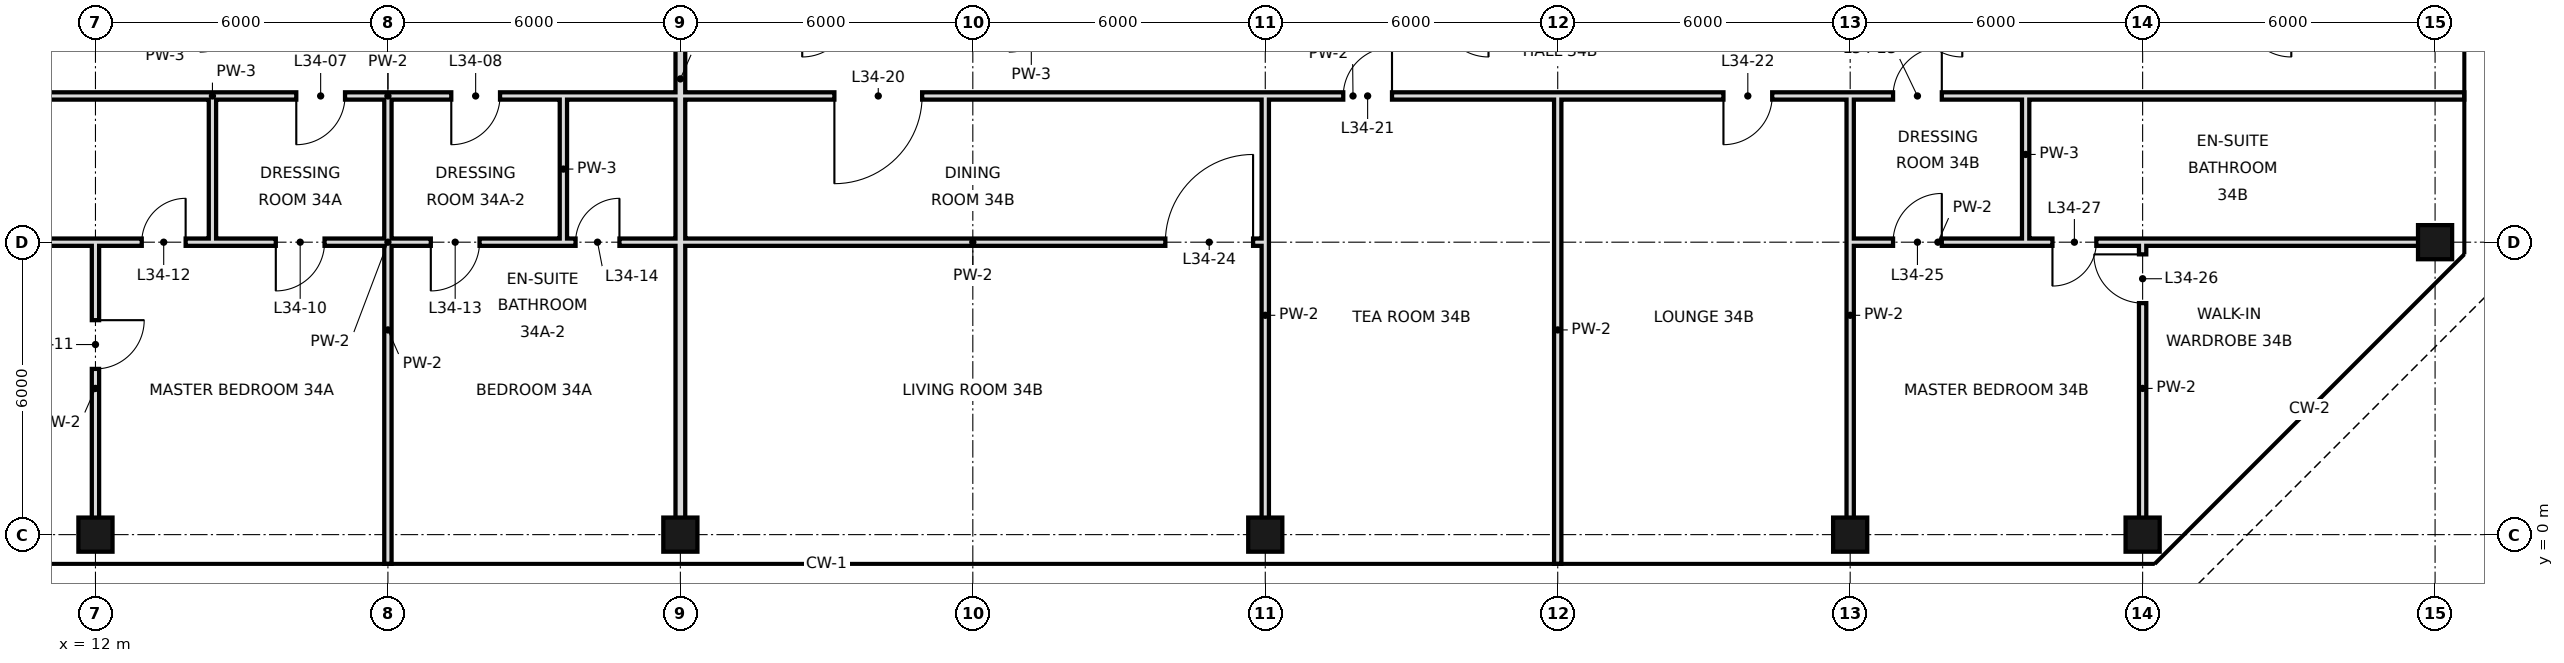
"""IFC4 building model, lengths in metres.
Left out: names, types, materials, properties, quantities, classifications, styles, units other than length and angle.
Written with IfcOpenShell. Run it as: python <this file> out.ifc"""

import sys

from ifc_helpers import new_model, si_unit, direction, frame, frame_2d, origin, origin_2d, place, context, subcontext, project, spatial, rectangle, hollow_rectangle, extrude, element, fill, save


model = new_model("IFC4")
c1 = context("Model", 3, precision=1e-05, world=origin(), true_north=direction((0.0, 1.0)))
c2 = subcontext(c1, "Body", "Model", "MODEL_VIEW")
j1 = project(units=[si_unit("LENGTHUNIT", "METRE"), si_unit("PLANEANGLEUNIT", "RADIAN")], contexts=[c1])
p1 = place(None, origin())
s1 = spatial("IfcSite", under=j1, at=p1, CompositionType="ELEMENT")
p2 = place(p1, origin())
s2 = spatial("IfcBuilding", under=s1, at=p2, CompositionType="ELEMENT")
p3 = place(p2, frame((0.0, 0.0, 151.0)))
s3 = spatial("IfcBuildingStorey", under=s2, at=p3, CompositionType="ELEMENT", Elevation=151.0)
for number, where, z_axis, x_axis in (
    (1, (12.0, 0.0, 0.0), (0.0, 0.0, 1.0), (1.0, 0.0, 0.0)),
    (2, (24.0, 0.0, 0.0), (0.0, 0.0, 1.0), (1.0, 0.0, 0.0)),
    (3, (36.0, 0.0, 0.0), (0.0, 0.0, 1.0), (1.0, 0.0, 0.0)),
    (4, (48.0, 0.0, 0.0), (0.0, 0.0, 1.0), (1.0, 0.0, 0.0)),
    (5, (54.0, 0.0, 0.0), (0.0, 0.0, 1.0), (1.0, 0.0, 0.0)),
    (6, (60.0, 6.0, 0.0), (0.0, 0.0, 1.0), (1.0, 0.0, 0.0)),
):
    element("IfcColumn", number, at=place(p3, frame(where, z_axis=z_axis, x_axis=x_axis)), inside=s3, PredefinedType="COLUMN", context=c2, shape_type="SweptSolid", body=[
        extrude(hollow_rectangle(XDim=0.7, YDim=0.7, WallThickness=0.036, at=origin_2d()), origin(), (0.0, 0.0, 1.0), 3.6),
    ])
p4 = place(p3, frame((12.0, 0.0, 0.0), z_axis=(0.0, 0.0, 1.0), x_axis=(0.0, 1.0, 0.0)))
e7 = element("IfcWall", 7, at=p4, inside=s3, PredefinedType="PARTITIONING", context=c2, shape_type="SweptSolid", body=[
    extrude(rectangle(XDim=6.0, YDim=0.15, at=frame_2d((3.0, 0.0))), origin(), (0.0, 0.0, 1.0), 2.72),
])
p5 = place(p4, frame((3.4, 0.0, 0.0)))
e8 = element("IfcOpeningElement", 8, at=p5, cuts=e7, PredefinedType="OPENING", context=c2, shape_type="SweptSolid", body=[
    extrude(rectangle(XDim=1.0, YDim=2.4, at=frame_2d((0.5, 1.2))), frame((0.0, 0.085, 0.0), z_axis=(0.0, -1.0, 0.0), x_axis=(1.0, 0.0, 0.0)), (0.0, 0.0, 1.0), 0.17),
])
p6 = place(p3, frame((14.4, 6.0, 0.0), z_axis=(0.0, 0.0, 1.0), x_axis=(0.0, 1.0, 0.0)))
e9 = element("IfcWall", 9, at=p6, inside=s3, PredefinedType="PARTITIONING", context=c2, shape_type="SweptSolid", body=[
    extrude(rectangle(XDim=3.0, YDim=0.15, at=frame_2d((1.5, 0.0))), origin(), (0.0, 0.0, 1.0), 3.42),
])
p7 = place(p3, frame((18.0, -0.6, 0.0), z_axis=(0.0, 0.0, 1.0), x_axis=(0.0, 1.0, 0.0)))
e10 = element("IfcWall", 10, at=p7, inside=s3, PredefinedType="PARTITIONING", context=c2, shape_type="SweptSolid", body=[
    extrude(rectangle(XDim=9.6, YDim=0.15, at=frame_2d((4.8, 0.0))), origin(), (0.0, 0.0, 1.0), 2.72),
])
p8 = place(p3, frame((21.6, 6.0, 0.0), z_axis=(0.0, 0.0, 1.0), x_axis=(0.0, 1.0, 0.0)))
e11 = element("IfcWall", 11, at=p8, inside=s3, PredefinedType="PARTITIONING", context=c2, shape_type="SweptSolid", body=[
    extrude(rectangle(XDim=3.0, YDim=0.15, at=frame_2d((1.5, 0.0))), origin(), (0.0, 0.0, 1.0), 3.42),
])
p9 = place(p3, frame((24.0, 0.0, 0.0), z_axis=(0.0, 0.0, 1.0), x_axis=(0.0, 1.0, 0.0)))
e12 = element("IfcWall", 12, at=p9, inside=s3, PredefinedType="SOLIDWALL", context=c2, shape_type="SweptSolid", body=[
    extrude(rectangle(XDim=18.7, YDim=0.2, at=frame_2d((9.35, 0.0))), origin(), (0.0, 0.0, 1.0), 2.72),
])
p10 = place(p3, frame((36.0, 0.0, 0.0), z_axis=(0.0, 0.0, 1.0), x_axis=(0.0, 1.0, 0.0)))
e13 = element("IfcWall", 13, at=p10, inside=s3, PredefinedType="PARTITIONING", context=c2, shape_type="SweptSolid", body=[
    extrude(rectangle(XDim=9.0, YDim=0.15, at=frame_2d((4.5, 0.0))), origin(), (0.0, 0.0, 1.0), 2.72),
])
p11 = place(p3, frame((42.0, -0.6, 0.0), z_axis=(0.0, 0.0, 1.0), x_axis=(0.0, 1.0, 0.0)))
e14 = element("IfcWall", 14, at=p11, inside=s3, PredefinedType="PARTITIONING", context=c2, shape_type="SweptSolid", body=[
    extrude(rectangle(XDim=9.6, YDim=0.15, at=frame_2d((4.8, 0.0))), origin(), (0.0, 0.0, 1.0), 2.72),
])
p12 = place(p3, frame((48.0, 0.0, 0.0), z_axis=(0.0, 0.0, 1.0), x_axis=(0.0, 1.0, 0.0)))
e15 = element("IfcWall", 15, at=p12, inside=s3, PredefinedType="PARTITIONING", context=c2, shape_type="SweptSolid", body=[
    extrude(rectangle(XDim=9.0, YDim=0.15, at=frame_2d((4.5, 0.0))), origin(), (0.0, 0.0, 1.0), 2.72),
])
p13 = place(p3, frame((51.6, 6.0, 0.0), z_axis=(0.0, 0.0, 1.0), x_axis=(0.0, 1.0, 0.0)))
e16 = element("IfcWall", 16, at=p13, inside=s3, PredefinedType="PARTITIONING", context=c2, shape_type="SweptSolid", body=[
    extrude(rectangle(XDim=3.0, YDim=0.15, at=frame_2d((1.5, 0.0))), origin(), (0.0, 0.0, 1.0), 3.42),
])
p14 = place(p3, frame((54.0, 0.0, 0.0), z_axis=(0.0, 0.0, 1.0), x_axis=(0.0, 1.0, 0.0)))
e17 = element("IfcWall", 17, at=p14, inside=s3, PredefinedType="PARTITIONING", context=c2, shape_type="SweptSolid", body=[
    extrude(rectangle(XDim=6.0, YDim=0.15, at=frame_2d((3.0, 0.0))), origin(), (0.0, 0.0, 1.0), 3.42),
])
p15 = place(p14, frame((4.75, 0.0, 0.0)))
e18 = element("IfcOpeningElement", 18, at=p15, cuts=e17, PredefinedType="OPENING", context=c2, shape_type="SweptSolid", body=[
    extrude(rectangle(XDim=1.0, YDim=2.4, at=frame_2d((0.5, 1.2))), frame((0.0, 0.085, 0.0), z_axis=(0.0, -1.0, 0.0), x_axis=(1.0, 0.0, 0.0)), (0.0, 0.0, 1.0), 0.17),
])
p16 = place(p3, frame((14.4, 6.0, 0.0), z_axis=(0.0, 0.0, 1.0), x_axis=(1.0, 0.0, 0.0)))
e19 = element("IfcWall", 19, at=p16, inside=s3, PredefinedType="PARTITIONING", context=c2, shape_type="SweptSolid", body=[
    extrude(rectangle(XDim=7.2, YDim=0.15, at=frame_2d((3.6, 0.0))), origin(), (0.0, 0.0, 1.0), 2.97),
])
p17 = place(p16, frame((1.3, 0.0, 0.0)))
e20 = element("IfcOpeningElement", 20, at=p17, cuts=e19, PredefinedType="OPENING", context=c2, shape_type="SweptSolid", body=[
    extrude(rectangle(XDim=1.0, YDim=2.4, at=frame_2d((0.5, 1.2))), frame((0.0, 0.085, 0.0), z_axis=(0.0, -1.0, 0.0), x_axis=(1.0, 0.0, 0.0)), (0.0, 0.0, 1.0), 0.17),
])
p18 = place(p16, frame((4.48, 0.0, 0.0)))
e21 = element("IfcOpeningElement", 21, at=p18, cuts=e19, PredefinedType="OPENING", context=c2, shape_type="SweptSolid", body=[
    extrude(rectangle(XDim=1.0, YDim=2.4, at=frame_2d((0.5, 1.2))), frame((0.0, 0.085, 0.0), z_axis=(0.0, -1.0, 0.0), x_axis=(1.0, 0.0, 0.0)), (0.0, 0.0, 1.0), 0.17),
])
p19 = place(p3, frame((24.0, 6.0, 0.0), z_axis=(0.0, 0.0, 1.0), x_axis=(1.0, 0.0, 0.0)))
e22 = element("IfcWall", 22, at=p19, inside=s3, PredefinedType="PARTITIONING", context=c2, shape_type="SweptSolid", body=[
    extrude(rectangle(XDim=12.0, YDim=0.15, at=frame_2d((6.0, 0.0))), origin(), (0.0, 0.0, 1.0), 2.97),
])
p20 = place(p19, frame((9.95, 0.0, 0.0)))
e23 = element("IfcOpeningElement", 23, at=p20, cuts=e22, PredefinedType="OPENING", context=c2, shape_type="SweptSolid", body=[
    extrude(rectangle(XDim=1.8, YDim=2.4, at=frame_2d((0.9, 1.2))), frame((0.0, 0.085, 0.0), z_axis=(0.0, -1.0, 0.0), x_axis=(1.0, 0.0, 0.0)), (0.0, 0.0, 1.0), 0.17),
])
p21 = place(p3, frame((48.0, 6.0, 0.0), z_axis=(0.0, 0.0, 1.0), x_axis=(1.0, 0.0, 0.0)))
e24 = element("IfcWall", 24, at=p21, inside=s3, PredefinedType="PARTITIONING", context=c2, shape_type="SweptSolid", body=[
    extrude(rectangle(XDim=3.6, YDim=0.15, at=frame_2d((1.8, 0.0))), origin(), (0.0, 0.0, 1.0), 2.72),
])
p22 = place(p21, frame((0.88, 0.0, 0.0)))
e25 = element("IfcOpeningElement", 25, at=p22, cuts=e24, PredefinedType="OPENING", context=c2, shape_type="SweptSolid", body=[
    extrude(rectangle(XDim=1.0, YDim=2.4, at=frame_2d((0.5, 1.2))), frame((0.0, 0.085, 0.0), z_axis=(0.0, -1.0, 0.0), x_axis=(1.0, 0.0, 0.0)), (0.0, 0.0, 1.0), 0.17),
])
p23 = place(p3, frame((6.0, 6.0, 0.0), z_axis=(0.0, 0.0, 1.0), x_axis=(1.0, 0.0, 0.0)))
e26 = element("IfcWall", 26, at=p23, inside=s3, PredefinedType="PARTITIONING", context=c2, shape_type="SweptSolid", body=[
    extrude(rectangle(XDim=8.4, YDim=0.15, at=frame_2d((4.2, 0.0))), origin(), (0.0, 0.0, 1.0), 2.97),
])
p24 = place(p23, frame((6.95, 0.0, 0.0)))
e27 = element("IfcOpeningElement", 27, at=p24, cuts=e26, PredefinedType="OPENING", context=c2, shape_type="SweptSolid", body=[
    extrude(rectangle(XDim=0.9, YDim=2.4, at=frame_2d((0.45, 1.2))), frame((0.0, 0.085, 0.0), z_axis=(0.0, -1.0, 0.0), x_axis=(1.0, 0.0, 0.0)), (0.0, 0.0, 1.0), 0.17),
])
p25 = place(p3, frame((21.6, 6.0, 0.0), z_axis=(0.0, 0.0, 1.0), x_axis=(1.0, 0.0, 0.0)))
e28 = element("IfcWall", 28, at=p25, inside=s3, PredefinedType="PARTITIONING", context=c2, shape_type="SweptSolid", body=[
    extrude(rectangle(XDim=2.4, YDim=0.15, at=frame_2d((1.2, 0.0))), origin(), (0.0, 0.0, 1.0), 2.97),
])
p26 = place(p25, frame((0.25, 0.0, 0.0)))
e29 = element("IfcOpeningElement", 29, at=p26, cuts=e28, PredefinedType="OPENING", context=c2, shape_type="SweptSolid", body=[
    extrude(rectangle(XDim=0.9, YDim=2.4, at=frame_2d((0.45, 1.2))), frame((0.0, 0.085, 0.0), z_axis=(0.0, -1.0, 0.0), x_axis=(1.0, 0.0, 0.0)), (0.0, 0.0, 1.0), 0.17),
])
p27 = place(p3, frame((51.6, 6.0, 0.0), z_axis=(0.0, 0.0, 1.0), x_axis=(1.0, 0.0, 0.0)))
e30 = element("IfcWall", 30, at=p27, inside=s3, PredefinedType="PARTITIONING", context=c2, shape_type="SweptSolid", body=[
    extrude(rectangle(XDim=8.4, YDim=0.15, at=frame_2d((4.2, 0.0))), origin(), (0.0, 0.0, 1.0), 2.72),
])
p28 = place(p27, frame((0.55, 0.0, 0.0)))
e31 = element("IfcOpeningElement", 31, at=p28, cuts=e30, PredefinedType="OPENING", context=c2, shape_type="SweptSolid", body=[
    extrude(rectangle(XDim=0.9, YDim=2.4, at=frame_2d((0.45, 1.2))), frame((0.0, 0.085, 0.0), z_axis=(0.0, -1.0, 0.0), x_axis=(1.0, 0.0, 0.0)), (0.0, 0.0, 1.0), 0.17),
])
p29 = place(p3, frame((14.4, 9.0, 0.0), z_axis=(0.0, 0.0, 1.0), x_axis=(1.0, 0.0, 0.0)))
e32 = element("IfcWall", 32, at=p29, inside=s3, PredefinedType="PARTITIONING", context=c2, shape_type="SweptSolid", body=[
    extrude(rectangle(XDim=7.2, YDim=0.15, at=frame_2d((3.6, 0.0))), origin(), (0.0, 0.0, 1.0), 3.42),
])
p30 = place(p29, frame((1.72, 0.0, 0.0)))
e33 = element("IfcOpeningElement", 33, at=p30, cuts=e32, PredefinedType="OPENING", context=c2, shape_type="SweptSolid", body=[
    extrude(rectangle(XDim=1.0, YDim=2.4, at=frame_2d((0.5, 1.2))), frame((0.0, 0.085, 0.0), z_axis=(0.0, -1.0, 0.0), x_axis=(1.0, 0.0, 0.0)), (0.0, 0.0, 1.0), 0.17),
])
p31 = place(p29, frame((4.9, 0.0, 0.0)))
e34 = element("IfcOpeningElement", 34, at=p31, cuts=e32, PredefinedType="OPENING", context=c2, shape_type="SweptSolid", body=[
    extrude(rectangle(XDim=1.0, YDim=2.4, at=frame_2d((0.5, 1.2))), frame((0.0, 0.085, 0.0), z_axis=(0.0, -1.0, 0.0), x_axis=(1.0, 0.0, 0.0)), (0.0, 0.0, 1.0), 0.17),
])
p32 = place(p3, frame((24.0, 9.0, 0.0), z_axis=(0.0, 0.0, 1.0), x_axis=(1.0, 0.0, 0.0)))
e35 = element("IfcWall", 35, at=p32, inside=s3, PredefinedType="PARTITIONING", context=c2, shape_type="SweptSolid", body=[
    extrude(rectangle(XDim=27.6, YDim=0.15, at=frame_2d((13.8, 0.0))), origin(), (0.0, 0.0, 1.0), 3.42),
])
p33 = place(p32, frame((3.16, 0.0, 0.0)))
e36 = element("IfcOpeningElement", 36, at=p33, cuts=e35, PredefinedType="OPENING", context=c2, shape_type="SweptSolid", body=[
    extrude(rectangle(XDim=1.8, YDim=2.4, at=frame_2d((0.9, 1.2))), frame((0.0, 0.085, 0.0), z_axis=(0.0, -1.0, 0.0), x_axis=(1.0, 0.0, 0.0)), (0.0, 0.0, 1.0), 0.17),
])
p34 = place(p32, frame((13.6, 0.0, 0.0)))
e37 = element("IfcOpeningElement", 37, at=p34, cuts=e35, PredefinedType="OPENING", context=c2, shape_type="SweptSolid", body=[
    extrude(rectangle(XDim=1.0, YDim=2.4, at=frame_2d((0.5, 1.2))), frame((0.0, 0.085, 0.0), z_axis=(0.0, -1.0, 0.0), x_axis=(1.0, 0.0, 0.0)), (0.0, 0.0, 1.0), 0.17),
])
p35 = place(p32, frame((21.4, 0.0, 0.0)))
e38 = element("IfcOpeningElement", 38, at=p35, cuts=e35, PredefinedType="OPENING", context=c2, shape_type="SweptSolid", body=[
    extrude(rectangle(XDim=1.0, YDim=2.4, at=frame_2d((0.5, 1.2))), frame((0.0, 0.085, 0.0), z_axis=(0.0, -1.0, 0.0), x_axis=(1.0, 0.0, 0.0)), (0.0, 0.0, 1.0), 0.17),
])
p36 = place(p32, frame((24.88, 0.0, 0.0)))
e39 = element("IfcOpeningElement", 39, at=p36, cuts=e35, PredefinedType="OPENING", context=c2, shape_type="SweptSolid", body=[
    extrude(rectangle(XDim=1.0, YDim=2.4, at=frame_2d((0.5, 1.2))), frame((0.0, 0.085, 0.0), z_axis=(0.0, -1.0, 0.0), x_axis=(1.0, 0.0, 0.0)), (0.0, 0.0, 1.0), 0.17),
])
p37 = place(p3, frame((6.0, 9.0, 0.0), z_axis=(0.0, 0.0, 1.0), x_axis=(1.0, 0.0, 0.0)))
e40 = element("IfcWall", 40, at=p37, inside=s3, PredefinedType="PARTITIONING", context=c2, shape_type="SweptSolid", body=[
    extrude(rectangle(XDim=8.4, YDim=0.15, at=frame_2d((4.2, 0.0))), origin(), (0.0, 0.0, 1.0), 3.42),
])
p38 = place(p3, frame((21.6, 9.0, 0.0), z_axis=(0.0, 0.0, 1.0), x_axis=(1.0, 0.0, 0.0)))
e41 = element("IfcWall", 41, at=p38, inside=s3, PredefinedType="PARTITIONING", context=c2, shape_type="SweptSolid", body=[
    extrude(rectangle(XDim=2.4, YDim=0.15, at=frame_2d((1.2, 0.0))), origin(), (0.0, 0.0, 1.0), 3.42),
])
p39 = place(p3, frame((51.6, 9.0, 0.0), z_axis=(0.0, 0.0, 1.0), x_axis=(1.0, 0.0, 0.0)))
e42 = element("IfcWall", 42, at=p39, inside=s3, PredefinedType="PARTITIONING", context=c2, shape_type="SweptSolid", body=[
    extrude(rectangle(XDim=9.0, YDim=0.15, at=frame_2d((4.5, 0.0))), origin(), (0.0, 0.0, 1.0), 3.42),
])
p40 = place(p30, frame((1.0, 0.0, 0.0), z_axis=(0.0, 0.0, 1.0), x_axis=(-1.0, 0.0, 0.0)))
e43 = element("IfcDoor", 43, at=p40, inside=s3, OperationType="SINGLE_SWING_RIGHT", PredefinedType="DOOR", context=c2, shape_type="SweptSolid", body=[
    extrude(rectangle(XDim=1.0, YDim=2.4, at=frame_2d((0.5, 1.2))), frame((0.0, 0.025, 0.0), z_axis=(0.0, -1.0, 0.0), x_axis=(1.0, 0.0, 0.0)), (0.0, 0.0, 1.0), 0.05),
])
fill(e33, e43)
p41 = place(p31, frame((1.0, 0.0, 0.0), z_axis=(0.0, 0.0, 1.0), x_axis=(-1.0, 0.0, 0.0)))
e44 = element("IfcDoor", 44, at=p41, inside=s3, OperationType="SINGLE_SWING_RIGHT", PredefinedType="DOOR", context=c2, shape_type="SweptSolid", body=[
    extrude(rectangle(XDim=1.0, YDim=2.4, at=frame_2d((0.5, 1.2))), frame((0.0, 0.025, 0.0), z_axis=(0.0, -1.0, 0.0), x_axis=(1.0, 0.0, 0.0)), (0.0, 0.0, 1.0), 0.05),
])
fill(e34, e44)
p42 = place(p17, frame((1.0, 0.0, 0.0), z_axis=(0.0, 0.0, 1.0), x_axis=(-1.0, 0.0, 0.0)))
e45 = element("IfcDoor", 45, at=p42, inside=s3, OperationType="SINGLE_SWING_RIGHT", PredefinedType="DOOR", context=c2, shape_type="SweptSolid", body=[
    extrude(rectangle(XDim=1.0, YDim=2.4, at=frame_2d((0.5, 1.2))), frame((0.0, 0.025, 0.0), z_axis=(0.0, -1.0, 0.0), x_axis=(1.0, 0.0, 0.0)), (0.0, 0.0, 1.0), 0.05),
])
fill(e20, e45)
p43 = place(p5, origin())
e46 = element("IfcDoor", 46, at=p43, inside=s3, OperationType="SINGLE_SWING_RIGHT", PredefinedType="DOOR", context=c2, shape_type="SweptSolid", body=[
    extrude(rectangle(XDim=1.0, YDim=2.4, at=frame_2d((0.5, 1.2))), frame((0.0, 0.025, 0.0), z_axis=(0.0, -1.0, 0.0), x_axis=(1.0, 0.0, 0.0)), (0.0, 0.0, 1.0), 0.05),
])
fill(e8, e46)
p44 = place(p24, frame((0.9, 0.0, 0.0), z_axis=(0.0, 0.0, 1.0), x_axis=(-1.0, 0.0, 0.0)))
e47 = element("IfcDoor", 47, at=p44, inside=s3, OperationType="SINGLE_SWING_LEFT", PredefinedType="DOOR", context=c2, shape_type="SweptSolid", body=[
    extrude(rectangle(XDim=0.9, YDim=2.4, at=frame_2d((0.45, 1.2))), frame((0.0, 0.025, 0.0), z_axis=(0.0, -1.0, 0.0), x_axis=(1.0, 0.0, 0.0)), (0.0, 0.0, 1.0), 0.05),
])
fill(e27, e47)
p45 = place(p18, frame((1.0, 0.0, 0.0), z_axis=(0.0, 0.0, 1.0), x_axis=(-1.0, 0.0, 0.0)))
e48 = element("IfcDoor", 48, at=p45, inside=s3, OperationType="SINGLE_SWING_RIGHT", PredefinedType="DOOR", context=c2, shape_type="SweptSolid", body=[
    extrude(rectangle(XDim=1.0, YDim=2.4, at=frame_2d((0.5, 1.2))), frame((0.0, 0.025, 0.0), z_axis=(0.0, -1.0, 0.0), x_axis=(1.0, 0.0, 0.0)), (0.0, 0.0, 1.0), 0.05),
])
fill(e21, e48)
p46 = place(p26, frame((0.9, 0.0, 0.0), z_axis=(0.0, 0.0, 1.0), x_axis=(-1.0, 0.0, 0.0)))
e49 = element("IfcDoor", 49, at=p46, inside=s3, OperationType="SINGLE_SWING_LEFT", PredefinedType="DOOR", context=c2, shape_type="SweptSolid", body=[
    extrude(rectangle(XDim=0.9, YDim=2.4, at=frame_2d((0.45, 1.2))), frame((0.0, 0.025, 0.0), z_axis=(0.0, -1.0, 0.0), x_axis=(1.0, 0.0, 0.0)), (0.0, 0.0, 1.0), 0.05),
])
fill(e29, e49)
p47 = place(p33, frame((1.8, 0.0, 0.0), z_axis=(0.0, 0.0, 1.0), x_axis=(-1.0, 0.0, 0.0)))
e50 = element("IfcDoor", 50, at=p47, inside=s3, OperationType="SINGLE_SWING_RIGHT", PredefinedType="DOOR", context=c2, shape_type="SweptSolid", body=[
    extrude(rectangle(XDim=1.8, YDim=2.4, at=frame_2d((0.9, 1.2))), frame((0.0, 0.025, 0.0), z_axis=(0.0, -1.0, 0.0), x_axis=(1.0, 0.0, 0.0)), (0.0, 0.0, 1.0), 0.05),
])
fill(e36, e50)
p48 = place(p34, frame((1.0, 0.0, 0.0), z_axis=(0.0, 0.0, 1.0), x_axis=(-1.0, 0.0, 0.0)))
e51 = element("IfcDoor", 51, at=p48, inside=s3, OperationType="SINGLE_SWING_LEFT", PredefinedType="DOOR", context=c2, shape_type="SweptSolid", body=[
    extrude(rectangle(XDim=1.0, YDim=2.4, at=frame_2d((0.5, 1.2))), frame((0.0, 0.025, 0.0), z_axis=(0.0, -1.0, 0.0), x_axis=(1.0, 0.0, 0.0)), (0.0, 0.0, 1.0), 0.05),
])
fill(e37, e51)
p49 = place(p35, frame((1.0, 0.0, 0.0), z_axis=(0.0, 0.0, 1.0), x_axis=(-1.0, 0.0, 0.0)))
e52 = element("IfcDoor", 52, at=p49, inside=s3, OperationType="SINGLE_SWING_RIGHT", PredefinedType="DOOR", context=c2, shape_type="SweptSolid", body=[
    extrude(rectangle(XDim=1.0, YDim=2.4, at=frame_2d((0.5, 1.2))), frame((0.0, 0.025, 0.0), z_axis=(0.0, -1.0, 0.0), x_axis=(1.0, 0.0, 0.0)), (0.0, 0.0, 1.0), 0.05),
])
fill(e38, e52)
p50 = place(p36, frame((1.0, 0.0, 0.0), z_axis=(0.0, 0.0, 1.0), x_axis=(-1.0, 0.0, 0.0)))
e53 = element("IfcDoor", 53, at=p50, inside=s3, OperationType="SINGLE_SWING_LEFT", PredefinedType="DOOR", context=c2, shape_type="SweptSolid", body=[
    extrude(rectangle(XDim=1.0, YDim=2.4, at=frame_2d((0.5, 1.2))), frame((0.0, 0.025, 0.0), z_axis=(0.0, -1.0, 0.0), x_axis=(1.0, 0.0, 0.0)), (0.0, 0.0, 1.0), 0.05),
])
fill(e39, e53)
p51 = place(p20, frame((1.8, 0.0, 0.0), z_axis=(0.0, 0.0, 1.0), x_axis=(-1.0, 0.0, 0.0)))
e54 = element("IfcDoor", 54, at=p51, inside=s3, OperationType="SINGLE_SWING_LEFT", PredefinedType="DOOR", context=c2, shape_type="SweptSolid", body=[
    extrude(rectangle(XDim=1.8, YDim=2.4, at=frame_2d((0.9, 1.2))), frame((0.0, 0.025, 0.0), z_axis=(0.0, -1.0, 0.0), x_axis=(1.0, 0.0, 0.0)), (0.0, 0.0, 1.0), 0.05),
])
fill(e23, e54)
p52 = place(p22, frame((1.0, 0.0, 0.0), z_axis=(0.0, 0.0, 1.0), x_axis=(-1.0, 0.0, 0.0)))
e55 = element("IfcDoor", 55, at=p52, inside=s3, OperationType="SINGLE_SWING_LEFT", PredefinedType="DOOR", context=c2, shape_type="SweptSolid", body=[
    extrude(rectangle(XDim=1.0, YDim=2.4, at=frame_2d((0.5, 1.2))), frame((0.0, 0.025, 0.0), z_axis=(0.0, -1.0, 0.0), x_axis=(1.0, 0.0, 0.0)), (0.0, 0.0, 1.0), 0.05),
])
fill(e25, e55)
p53 = place(p15, frame((1.0, 0.0, 0.0), z_axis=(0.0, 0.0, 1.0), x_axis=(-1.0, 0.0, 0.0)))
e56 = element("IfcDoor", 56, at=p53, inside=s3, OperationType="SINGLE_SWING_LEFT", PredefinedType="DOOR", context=c2, shape_type="SweptSolid", body=[
    extrude(rectangle(XDim=1.0, YDim=2.4, at=frame_2d((0.5, 1.2))), frame((0.0, 0.025, 0.0), z_axis=(0.0, -1.0, 0.0), x_axis=(1.0, 0.0, 0.0)), (0.0, 0.0, 1.0), 0.05),
])
fill(e18, e56)
p54 = place(p28, frame((0.9, 0.0, 0.0), z_axis=(0.0, 0.0, 1.0), x_axis=(-1.0, 0.0, 0.0)))
e57 = element("IfcDoor", 57, at=p54, inside=s3, OperationType="SINGLE_SWING_RIGHT", PredefinedType="DOOR", context=c2, shape_type="SweptSolid", body=[
    extrude(rectangle(XDim=0.9, YDim=2.4, at=frame_2d((0.45, 1.2))), frame((0.0, 0.025, 0.0), z_axis=(0.0, -1.0, 0.0), x_axis=(1.0, 0.0, 0.0)), (0.0, 0.0, 1.0), 0.05),
])
fill(e31, e57)
save(model, sys.argv[1])
